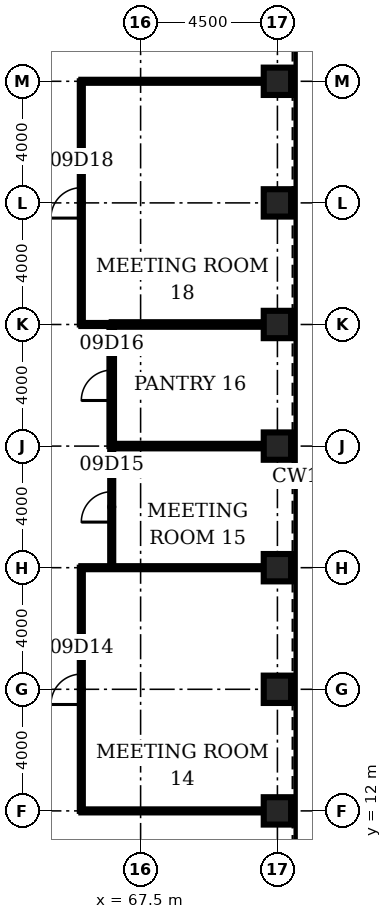
"""IFC4 building model, lengths in metres.
Left out: names, types, materials, properties, quantities, classifications, styles, units other than length and angle.
Written with IfcOpenShell. Run it as: python <this file> out.ifc"""

import sys

from ifc_helpers import new_model, si_unit, direction, frame, frame_2d, origin, origin_2d, place, context, subcontext, project, spatial, rectangle, hollow_rectangle, extrude, element, fill, save


model = new_model("IFC4")
c1 = context("Model", 3, precision=1e-05, world=origin(), true_north=direction((0.0, 1.0)))
c2 = subcontext(c1, "Body", "Model", "MODEL_VIEW")
j1 = project(units=[si_unit("LENGTHUNIT", "METRE"), si_unit("PLANEANGLEUNIT", "RADIAN")], contexts=[c1])
p1 = place(None, origin())
s1 = spatial("IfcSite", under=j1, at=p1, CompositionType="ELEMENT")
p2 = place(p1, origin())
s2 = spatial("IfcBuilding", under=s1, at=p2, CompositionType="ELEMENT")
p3 = place(p2, frame((0.0, 0.0, 45.5)))
s3 = spatial("IfcBuildingStorey", under=s2, at=p3, CompositionType="ELEMENT", Elevation=45.5)
for number, where, z_axis, x_axis in (
    (1, (72.0, 12.0, 0.0), (0.0, 0.0, 1.0), (1.0, 0.0, 0.0)),
    (2, (72.0, 16.0, 0.0), (0.0, 0.0, 1.0), (1.0, 0.0, 0.0)),
    (3, (72.0, 20.0, 0.0), (0.0, 0.0, 1.0), (1.0, 0.0, 0.0)),
    (4, (72.0, 24.0, 0.0), (0.0, 0.0, 1.0), (1.0, 0.0, 0.0)),
    (5, (72.0, 28.0, 0.0), (0.0, 0.0, 1.0), (1.0, 0.0, 0.0)),
    (6, (72.0, 32.0, 0.0), (0.0, 0.0, 1.0), (1.0, 0.0, 0.0)),
    (7, (72.0, 36.0, 0.0), (0.0, 0.0, 1.0), (1.0, 0.0, 0.0)),
):
    element("IfcColumn", number, at=place(p3, frame(where, z_axis=z_axis, x_axis=x_axis)), inside=s3, PredefinedType="COLUMN", context=c2, shape_type="SweptSolid", body=[
        extrude(hollow_rectangle(XDim=0.9, YDim=0.9, WallThickness=0.12, at=origin_2d()), origin(), (0.0, 0.0, 1.0), 4.5),
    ])
for number, where, z_axis, x_axis in (
    (8, (65.55, 12.0, 0.0), (0.0, 0.0, 1.0), (1.0, 0.0, 0.0)),
    (9, (65.55, 20.0, 0.0), (0.0, 0.0, 1.0), (1.0, 0.0, 0.0)),
):
    element("IfcWall", number, at=place(p3, frame(where, z_axis=z_axis, x_axis=x_axis)), inside=s3, PredefinedType="PARTITIONING", context=c2, shape_type="SweptSolid", body=[
        extrude(rectangle(XDim=6.0, YDim=0.1, at=frame_2d((3.0, 0.0))), origin(), (0.0, 0.0, 1.0), 3.0),
    ])
p4 = place(p3, frame((66.55, 24.0, 0.0), z_axis=(0.0, 0.0, 1.0), x_axis=(1.0, 0.0, 0.0)))
e10 = element("IfcWall", 10, at=p4, inside=s3, PredefinedType="PARTITIONING", context=c2, shape_type="SweptSolid", body=[
    extrude(rectangle(XDim=5.0, YDim=0.15, at=frame_2d((2.5, 0.0))), origin(), (0.0, 0.0, 1.0), 3.0),
])
p5 = place(p3, frame((65.55, 28.0, 0.0), z_axis=(0.0, 0.0, 1.0), x_axis=(1.0, 0.0, 0.0)))
e11 = element("IfcWall", 11, at=p5, inside=s3, PredefinedType="PARTITIONING", context=c2, shape_type="SweptSolid", body=[
    extrude(rectangle(XDim=1.0, YDim=0.1, at=frame_2d((0.5, 0.0))), origin(), (0.0, 0.0, 1.0), 3.0),
])
p6 = place(p3, frame((66.55, 28.0, 0.0), z_axis=(0.0, 0.0, 1.0), x_axis=(1.0, 0.0, 0.0)))
e12 = element("IfcWall", 12, at=p6, inside=s3, PredefinedType="PARTITIONING", context=c2, shape_type="SweptSolid", body=[
    extrude(rectangle(XDim=5.0, YDim=0.15, at=frame_2d((2.5, 0.0))), origin(), (0.0, 0.0, 1.0), 3.0),
])
p7 = place(p3, frame((65.55, 36.0, 0.0), z_axis=(0.0, 0.0, 1.0), x_axis=(1.0, 0.0, 0.0)))
e13 = element("IfcWall", 13, at=p7, inside=s3, PredefinedType="PARTITIONING", context=c2, shape_type="SweptSolid", body=[
    extrude(rectangle(XDim=6.0, YDim=0.1, at=frame_2d((3.0, 0.0))), origin(), (0.0, 0.0, 1.0), 3.0),
])
p8 = place(p3, frame((65.55, 12.0, 0.0), z_axis=(0.0, 0.0, 1.0), x_axis=(0.0, 1.0, 0.0)))
e14 = element("IfcWall", 14, at=p8, inside=s3, PredefinedType="PARTITIONING", context=c2, shape_type="SweptSolid", body=[
    extrude(rectangle(XDim=8.0, YDim=0.1, at=frame_2d((4.0, 0.0))), origin(), (0.0, 0.0, 1.0), 3.0),
])
p9 = place(p8, frame((3.5, 0.0, 0.0)))
e15 = element("IfcOpeningElement", 15, at=p9, cuts=e14, PredefinedType="OPENING", context=c2, shape_type="SweptSolid", body=[
    extrude(rectangle(XDim=1.0, YDim=2.1, at=frame_2d((0.5, 1.05))), frame((0.0, 0.06, 0.0), z_axis=(0.0, -1.0, 0.0), x_axis=(1.0, 0.0, 0.0)), (0.0, 0.0, 1.0), 0.12),
])
p10 = place(p3, frame((65.55, 28.0, 0.0), z_axis=(0.0, 0.0, 1.0), x_axis=(0.0, 1.0, 0.0)))
e16 = element("IfcWall", 16, at=p10, inside=s3, PredefinedType="PARTITIONING", context=c2, shape_type="SweptSolid", body=[
    extrude(rectangle(XDim=8.0, YDim=0.1, at=frame_2d((4.0, 0.0))), origin(), (0.0, 0.0, 1.0), 3.0),
])
p11 = place(p10, frame((3.5, 0.0, 0.0)))
e17 = element("IfcOpeningElement", 17, at=p11, cuts=e16, PredefinedType="OPENING", context=c2, shape_type="SweptSolid", body=[
    extrude(rectangle(XDim=1.0, YDim=2.1, at=frame_2d((0.5, 1.05))), frame((0.0, 0.06, 0.0), z_axis=(0.0, -1.0, 0.0), x_axis=(1.0, 0.0, 0.0)), (0.0, 0.0, 1.0), 0.12),
])
p12 = place(p3, frame((66.55, 20.0, 0.0), z_axis=(0.0, 0.0, 1.0), x_axis=(0.0, 1.0, 0.0)))
e18 = element("IfcWall", 18, at=p12, inside=s3, PredefinedType="PARTITIONING", context=c2, shape_type="SweptSolid", body=[
    extrude(rectangle(XDim=4.0, YDim=0.1, at=frame_2d((2.0, 0.0))), origin(), (0.0, 0.0, 1.0), 3.0),
])
p13 = place(p12, frame((1.5, 0.0, 0.0)))
e19 = element("IfcOpeningElement", 19, at=p13, cuts=e18, PredefinedType="OPENING", context=c2, shape_type="SweptSolid", body=[
    extrude(rectangle(XDim=1.0, YDim=2.1, at=frame_2d((0.5, 1.05))), frame((0.0, 0.06, 0.0), z_axis=(0.0, -1.0, 0.0), x_axis=(1.0, 0.0, 0.0)), (0.0, 0.0, 1.0), 0.12),
])
p14 = place(p3, frame((66.55, 24.0, 0.0), z_axis=(0.0, 0.0, 1.0), x_axis=(0.0, 1.0, 0.0)))
e20 = element("IfcWall", 20, at=p14, inside=s3, PredefinedType="PARTITIONING", context=c2, shape_type="SweptSolid", body=[
    extrude(rectangle(XDim=4.0, YDim=0.15, at=frame_2d((2.0, 0.0))), origin(), (0.0, 0.0, 1.0), 3.0),
])
p15 = place(p14, frame((1.5, 0.0, 0.0)))
e21 = element("IfcOpeningElement", 21, at=p15, cuts=e20, PredefinedType="OPENING", context=c2, shape_type="SweptSolid", body=[
    extrude(rectangle(XDim=1.0, YDim=2.1, at=frame_2d((0.5, 1.05))), frame((0.0, 0.085, 0.0), z_axis=(0.0, -1.0, 0.0), x_axis=(1.0, 0.0, 0.0)), (0.0, 0.0, 1.0), 0.17),
])
p16 = place(p9, origin())
e22 = element("IfcDoor", 22, at=p16, inside=s3, OperationType="SINGLE_SWING_LEFT", PredefinedType="DOOR", context=c2, shape_type="SweptSolid", body=[
    extrude(rectangle(XDim=1.0, YDim=2.1, at=frame_2d((0.5, 1.05))), frame((0.0, 0.025, 0.0), z_axis=(0.0, -1.0, 0.0), x_axis=(1.0, 0.0, 0.0)), (0.0, 0.0, 1.0), 0.05),
])
fill(e15, e22)
p17 = place(p13, origin())
e23 = element("IfcDoor", 23, at=p17, inside=s3, OperationType="SINGLE_SWING_LEFT", PredefinedType="DOOR", context=c2, shape_type="SweptSolid", body=[
    extrude(rectangle(XDim=1.0, YDim=2.1, at=frame_2d((0.5, 1.05))), frame((0.0, 0.025, 0.0), z_axis=(0.0, -1.0, 0.0), x_axis=(1.0, 0.0, 0.0)), (0.0, 0.0, 1.0), 0.05),
])
fill(e19, e23)
p18 = place(p15, origin())
e24 = element("IfcDoor", 24, at=p18, inside=s3, OperationType="SINGLE_SWING_LEFT", PredefinedType="DOOR", context=c2, shape_type="SweptSolid", body=[
    extrude(rectangle(XDim=1.0, YDim=2.1, at=frame_2d((0.5, 1.05))), frame((0.0, 0.025, 0.0), z_axis=(0.0, -1.0, 0.0), x_axis=(1.0, 0.0, 0.0)), (0.0, 0.0, 1.0), 0.05),
])
fill(e21, e24)
p19 = place(p11, origin())
e25 = element("IfcDoor", 25, at=p19, inside=s3, OperationType="SINGLE_SWING_LEFT", PredefinedType="DOOR", context=c2, shape_type="SweptSolid", body=[
    extrude(rectangle(XDim=1.0, YDim=2.1, at=frame_2d((0.5, 1.05))), frame((0.0, 0.025, 0.0), z_axis=(0.0, -1.0, 0.0), x_axis=(1.0, 0.0, 0.0)), (0.0, 0.0, 1.0), 0.05),
])
fill(e17, e25)
save(model, sys.argv[1])
